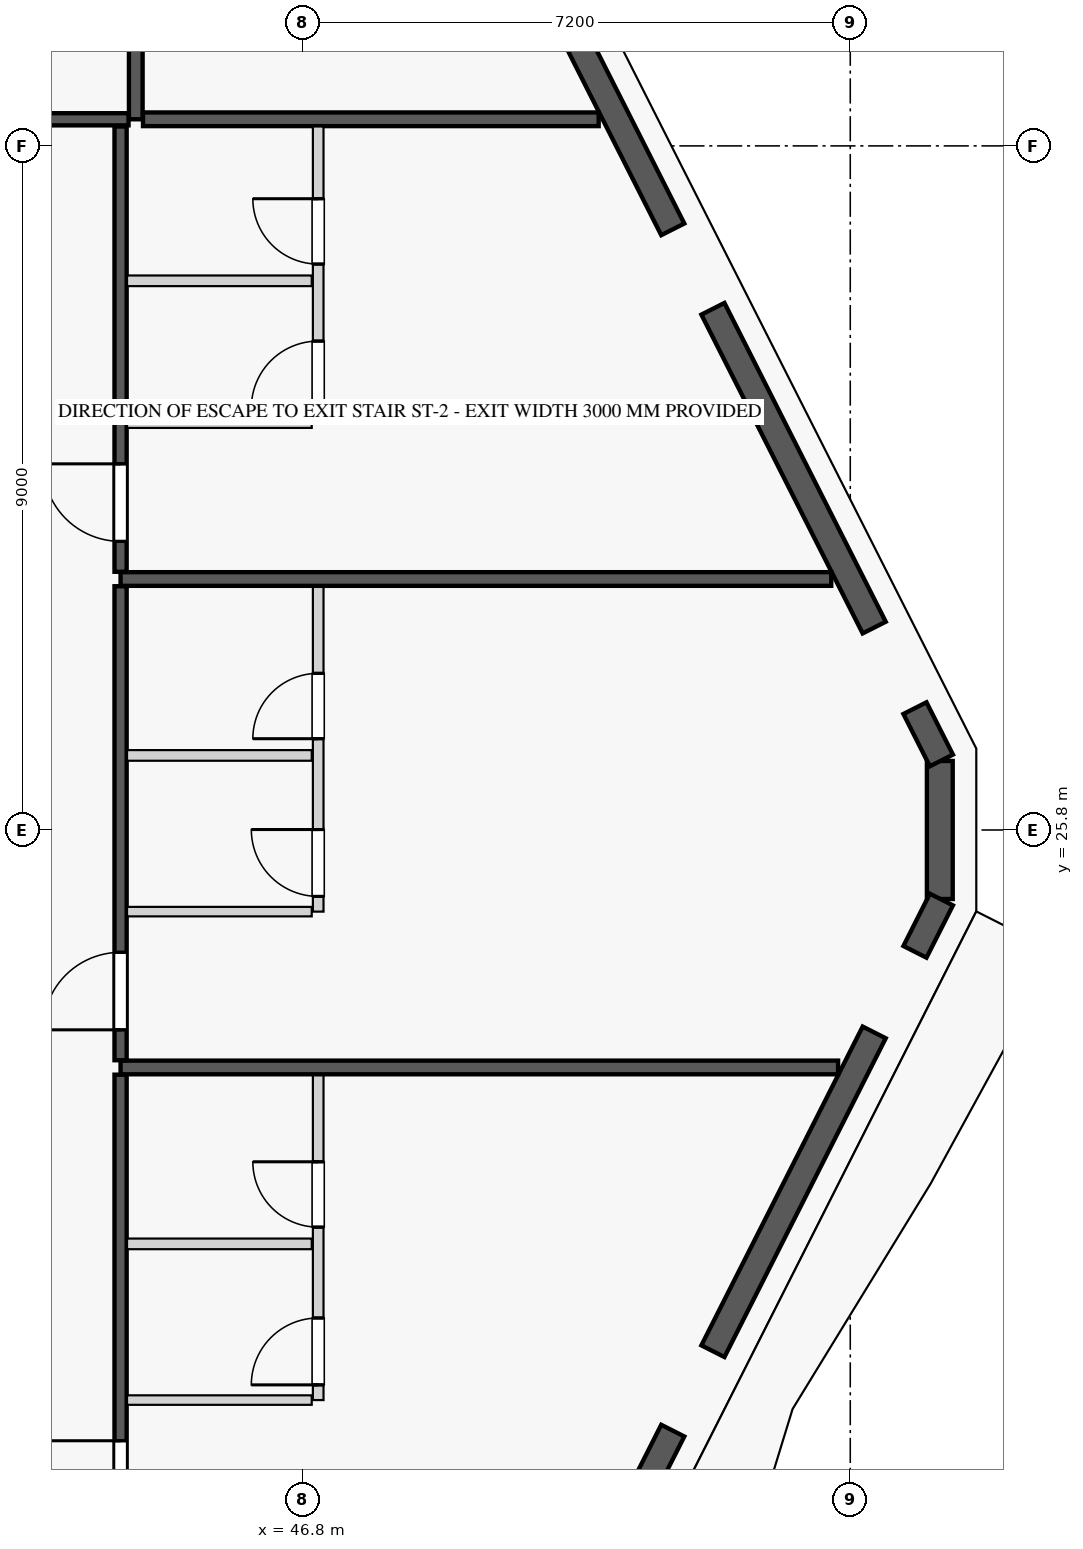
"""IFC4 building model, lengths in metres.
Left out: names, types, materials, properties, quantities, classifications, styles, units other than length and angle.
Written with IfcOpenShell. Run it as: python <this file> out.ifc"""

import sys

from ifc_helpers import new_model, si_unit, direction, frame, frame_2d, origin, origin_2d, place, context, subcontext, project, spatial, rectangle, extrude, element, fill, save


model = new_model("IFC4")
c1 = context("Model", 3, precision=1e-05, world=origin(), true_north=direction((0.0, 1.0)))
c2 = subcontext(c1, "Body", "Model", "MODEL_VIEW")
j1 = project(units=[si_unit("LENGTHUNIT", "METRE"), si_unit("PLANEANGLEUNIT", "RADIAN")], contexts=[c1])
p1 = place(None, origin())
s1 = spatial("IfcSite", under=j1, at=p1, CompositionType="ELEMENT")
p2 = place(p1, origin())
s2 = spatial("IfcBuilding", under=s1, at=p2, CompositionType="ELEMENT")
p3 = place(p2, frame((0.0, 0.0, 186.1)))
s3 = spatial("IfcBuildingStorey", under=s2, at=p3, CompositionType="ELEMENT", Elevation=186.1)
for number, where, z_axis, x_axis in (
    (1, (51.858, 18.429, 0.0), (0.0, 0.0, 1.0), (1.0, 0.0, 0.0)),
    (2, (54.547, 23.668, 0.0), (0.0, 0.0, 1.0), (1.0, 0.0, 0.0)),
    (3, (54.547, 27.932, 0.0), (0.0, 0.0, 1.0), (1.0, 0.0, 0.0)),
    (4, (51.858, 33.171, 0.0), (0.0, 0.0, 1.0), (1.0, 0.0, 0.0)),
):
    element("IfcColumn", number, at=place(p3, frame(where, z_axis=z_axis, x_axis=x_axis)), inside=s3, PredefinedType="COLUMN", context=c2, shape_type="SweptSolid", body=[
        extrude(rectangle(XDim=0.9, YDim=0.9, at=origin_2d()), origin(), (0.0, 0.0, 1.0), 3.55),
    ])
p4 = place(p3, frame((54.547, 25.8, 0.0), z_axis=(0.0, 0.0, 1.0), x_axis=(0.0, 1.0, 0.0)))
e5 = element("IfcColumn", 5, at=p4, inside=s3, PredefinedType="PILASTER", context=c2, shape_type="SweptSolid", body=[
    extrude(rectangle(XDim=0.5, YDim=0.35, at=origin_2d()), origin(), (0.0, 0.0, 1.0), 3.55),
])
p5 = place(p3, frame((55.178, 24.892, 0.0), z_axis=(0.0, 0.0, 1.0), x_axis=(0.0, 1.0, 0.0)))
e6 = element("IfcWall", 6, at=p5, inside=s3, PredefinedType="STANDARD", context=c2, shape_type="SweptSolid", body=[
    extrude(rectangle(XDim=1.816, YDim=0.34, at=frame_2d((0.908, 0.0))), origin(), (0.0, 0.0, 1.0), 3.35),
])
p6 = place(p5, frame((0.358, 0.0, 0.75)))
e7 = element("IfcOpeningElement", 7, at=p6, cuts=e6, PredefinedType="OPENING", context=c2, shape_type="SweptSolid", body=[
    extrude(rectangle(XDim=1.1, YDim=2.0, at=frame_2d((0.55, 1.0))), frame((0.0, 0.18, 0.0), z_axis=(0.0, -1.0, 0.0), x_axis=(1.0, 0.0, 0.0)), (0.0, 0.0, 1.0), 0.36),
])
p7 = place(p3, frame((49.448, 13.517, 0.0), z_axis=(0.0, 0.0, 1.0), x_axis=(0.451544279509, 0.892248711763, 0.0)))
e8 = element("IfcWall", 8, at=p7, inside=s3, PredefinedType="STANDARD", context=c2, shape_type="SweptSolid", body=[
    extrude(rectangle(XDim=4.91, YDim=0.34, at=frame_2d((2.455, 0.0))), origin(), (0.0, 0.0, 1.0), 2.883),
])
p8 = place(p7, frame((0.856, 0.0, 0.0)))
e9 = element("IfcOpeningElement", 9, at=p8, cuts=e8, PredefinedType="OPENING", context=c2, shape_type="SweptSolid", body=[
    extrude(rectangle(XDim=1.1, YDim=2.25, at=frame_2d((0.55, 1.125))), frame((0.0, 0.18, 0.0), z_axis=(0.0, -1.0, 0.0), x_axis=(1.0, 0.0, 0.0)), (0.0, 0.0, 1.0), 0.36),
])
p9 = place(p7, frame((3.457, 0.0, 0.75)))
e10 = element("IfcOpeningElement", 10, at=p9, cuts=e8, PredefinedType="OPENING", context=c2, shape_type="SweptSolid", body=[
    extrude(rectangle(XDim=1.1, YDim=1.983, at=frame_2d((0.55, 0.991))), frame((0.0, 0.18, 0.0), z_axis=(0.0, -1.0, 0.0), x_axis=(1.0, 0.0, 0.0)), (0.0, 0.0, 1.0), 0.36),
])
p10 = place(p3, frame((52.193, 18.943, 0.0), z_axis=(0.0, 0.0, 1.0), x_axis=(0.451447222193, 0.892297823361, 0.0)))
e11 = element("IfcWall", 11, at=p10, inside=s3, PredefinedType="STANDARD", context=c2, shape_type="SweptSolid", body=[
    extrude(rectangle(XDim=4.7, YDim=0.34, at=frame_2d((2.35, 0.0))), origin(), (0.0, 0.0, 1.0), 2.883),
])
p11 = place(p10, frame((1.8, 0.0, 0.75)))
e12 = element("IfcOpeningElement", 12, at=p11, cuts=e11, PredefinedType="OPENING", context=c2, shape_type="SweptSolid", body=[
    extrude(rectangle(XDim=1.1, YDim=1.983, at=frame_2d((0.55, 0.991))), frame((0.0, 0.18, 0.0), z_axis=(0.0, -1.0, 0.0), x_axis=(1.0, 0.0, 0.0)), (0.0, 0.0, 1.0), 0.36),
])
for number, where, z_axis, x_axis in (
    (13, (54.851, 24.197, 0.0), (0.0, 0.0, 1.0), (0.451, 0.892, 0.0)),
    (14, (55.199, 26.715, 0.0), (0.0, 0.0, 1.0), (-0.451, 0.892, 0.0)),
):
    element("IfcWall", number, at=place(p3, frame(where, z_axis=z_axis, x_axis=x_axis)), inside=s3, PredefinedType="STANDARD", context=c2, shape_type="SweptSolid", body=[
        extrude(rectangle(XDim=0.771, YDim=0.34, at=frame_2d((0.385, 0.0))), origin(), (0.0, 0.0, 1.0), 3.35),
    ])
p12 = place(p3, frame((54.315, 28.463, 0.0), z_axis=(0.0, 0.0, 1.0), x_axis=(-0.451426298588, 0.892308409096, 0.0)))
e15 = element("IfcWall", 15, at=p12, inside=s3, PredefinedType="STANDARD", context=c2, shape_type="SweptSolid", body=[
    extrude(rectangle(XDim=4.7, YDim=0.34, at=frame_2d((2.35, 0.0))), origin(), (0.0, 0.0, 1.0), 2.883),
])
p13 = place(p12, frame((1.8, 0.0, 0.75)))
e16 = element("IfcOpeningElement", 16, at=p13, cuts=e15, PredefinedType="OPENING", context=c2, shape_type="SweptSolid", body=[
    extrude(rectangle(XDim=1.1, YDim=1.983, at=frame_2d((0.55, 0.991))), frame((0.0, 0.18, 0.0), z_axis=(0.0, -1.0, 0.0), x_axis=(1.0, 0.0, 0.0)), (0.0, 0.0, 1.0), 0.36),
])
p14 = place(p3, frame((51.665, 33.702, 0.0), z_axis=(0.0, 0.0, 1.0), x_axis=(-0.451524246964, 0.89225884944, 0.0)))
e17 = element("IfcWall", 17, at=p14, inside=s3, PredefinedType="STANDARD", context=c2, shape_type="SweptSolid", body=[
    extrude(rectangle(XDim=4.91, YDim=0.34, at=frame_2d((2.455, 0.0))), origin(), (0.0, 0.0, 1.0), 2.883),
])
p15 = place(p14, frame((0.241, 0.0, 0.75)))
e18 = element("IfcOpeningElement", 18, at=p15, cuts=e17, PredefinedType="OPENING", context=c2, shape_type="SweptSolid", body=[
    extrude(rectangle(XDim=1.1, YDim=1.983, at=frame_2d((0.55, 0.991))), frame((0.0, 0.18, 0.0), z_axis=(0.0, -1.0, 0.0), x_axis=(1.0, 0.0, 0.0)), (0.0, 0.0, 1.0), 0.36),
])
p16 = place(p14, frame((2.847, 0.0, 0.75)))
e19 = element("IfcOpeningElement", 19, at=p16, cuts=e17, PredefinedType="OPENING", context=c2, shape_type="SweptSolid", body=[
    extrude(rectangle(XDim=1.1, YDim=1.983, at=frame_2d((0.55, 0.991))), frame((0.0, 0.18, 0.0), z_axis=(0.0, -1.0, 0.0), x_axis=(1.0, 0.0, 0.0)), (0.0, 0.0, 1.0), 0.36),
])
p17 = place(p3, frame((44.6, 35.15, 0.0), z_axis=(0.0, 0.0, 1.0), x_axis=(0.0, 1.0, 0.0)))
e20 = element("IfcWall", 20, at=p17, inside=s3, PredefinedType="PARTITIONING", context=c2, shape_type="SweptSolid", body=[
    extrude(rectangle(XDim=10.482, YDim=0.18, at=frame_2d((5.241, 0.0))), origin(), (0.0, 0.0, 1.0), 3.35),
])
p18 = place(p3, frame((20.295, 35.15, 0.0), z_axis=(0.0, 0.0, 1.0), x_axis=(1.0, 0.0, 0.0)))
e21 = element("IfcWall", 21, at=p18, inside=s3, PredefinedType="PARTITIONING", context=c2, shape_type="SweptSolid", body=[
    extrude(rectangle(XDim=24.21, YDim=0.16, at=frame_2d((12.105, 0.0))), origin(), (0.0, 0.0, 1.0), 3.35),
])
p19 = place(p18, frame((0.405, 0.0, 0.0)))
e22 = element("IfcOpeningElement", 22, at=p19, cuts=e21, PredefinedType="OPENING", context=c2, shape_type="SweptSolid", body=[
    extrude(rectangle(XDim=1.35, YDim=2.35, at=frame_2d((0.675, 1.175))), frame((0.0, 0.09, 0.0), z_axis=(0.0, -1.0, 0.0), x_axis=(1.0, 0.0, 0.0)), (0.0, 0.0, 1.0), 0.18),
])
p20 = place(p3, frame((44.695, 35.15, 0.0), z_axis=(0.0, 0.0, 1.0), x_axis=(1.0, 0.0, 0.0)))
e23 = element("IfcWall", 23, at=p20, inside=s3, PredefinedType="PARTITIONING", context=c2, shape_type="SweptSolid", body=[
    extrude(rectangle(XDim=5.995, YDim=0.18, at=frame_2d((2.998, 0.0))), origin(), (0.0, 0.0, 1.0), 3.35),
])
p21 = place(p3, frame((44.4, 16.345, 0.0), z_axis=(0.0, 0.0, 1.0), x_axis=(0.0, 1.0, 0.0)))
e24 = element("IfcWall", 24, at=p21, inside=s3, PredefinedType="PARTITIONING", context=c2, shape_type="SweptSolid", body=[
    extrude(rectangle(XDim=6.236, YDim=0.16, at=frame_2d((3.118, 0.0))), origin(), (0.0, 0.0, 1.0), 3.35),
])
p22 = place(p21, frame((0.4, 0.0, 0.0)))
e25 = element("IfcOpeningElement", 25, at=p22, cuts=e24, PredefinedType="OPENING", context=c2, shape_type="SweptSolid", body=[
    extrude(rectangle(XDim=1.02, YDim=2.25, at=frame_2d((0.51, 1.125))), frame((0.0, 0.09, 0.0), z_axis=(0.0, -1.0, 0.0), x_axis=(1.0, 0.0, 0.0)), (0.0, 0.0, 1.0), 0.18),
])
p23 = place(p3, frame((44.485, 18.3, 0.0), z_axis=(0.0, 0.0, 1.0), x_axis=(1.0, 0.0, 0.0)))
e26 = element("IfcWall", 26, at=p23, inside=s3, PredefinedType="PARTITIONING", context=c2, shape_type="SweptSolid", body=[
    extrude(rectangle(XDim=2.43, YDim=0.125, at=frame_2d((1.215, 0.0))), origin(), (0.0, 0.0, 1.0), 2.807),
])
p24 = place(p3, frame((47.0, 18.3, 0.0), z_axis=(0.0, 0.0, 1.0), x_axis=(0.0, 1.0, 0.0)))
e27 = element("IfcWall", 27, at=p24, inside=s3, PredefinedType="PLUMBINGWALL", context=c2, shape_type="SweptSolid", body=[
    extrude(rectangle(XDim=4.281, YDim=0.14, at=frame_2d((2.141, 0.0))), origin(), (0.0, 0.0, 1.0), 3.35),
])
p25 = place(p24, frame((2.275, 0.0, 0.0)))
e28 = element("IfcOpeningElement", 28, at=p25, cuts=e27, PredefinedType="OPENING", context=c2, shape_type="SweptSolid", body=[
    extrude(rectangle(XDim=0.86, YDim=2.1, at=frame_2d((0.43, 1.05))), frame((0.0, 0.08, 0.0), z_axis=(0.0, -1.0, 0.0), x_axis=(1.0, 0.0, 0.0)), (0.0, 0.0, 1.0), 0.16),
])
p26 = place(p24, frame((0.2, 0.0, 0.0)))
e29 = element("IfcOpeningElement", 29, at=p26, cuts=e27, PredefinedType="OPENING", context=c2, shape_type="SweptSolid", body=[
    extrude(rectangle(XDim=0.88, YDim=2.15, at=frame_2d((0.44, 1.075))), frame((0.0, 0.08, 0.0), z_axis=(0.0, -1.0, 0.0), x_axis=(1.0, 0.0, 0.0)), (0.0, 0.0, 1.0), 0.16),
])
p27 = place(p3, frame((44.485, 20.355, 0.0), z_axis=(0.0, 0.0, 1.0), x_axis=(1.0, 0.0, 0.0)))
e30 = element("IfcWall", 30, at=p27, inside=s3, PredefinedType="PLUMBINGWALL", context=c2, shape_type="SweptSolid", body=[
    extrude(rectangle(XDim=2.43, YDim=0.14, at=frame_2d((1.215, 0.0))), origin(), (0.0, 0.0, 1.0), 3.35),
])
p28 = place(p3, frame((44.4, 22.676, 0.0), z_axis=(0.0, 0.0, 1.0), x_axis=(1.0, 0.0, 0.0)))
e31 = element("IfcWall", 31, at=p28, inside=s3, PredefinedType="PARTITIONING", context=c2, shape_type="SweptSolid", body=[
    extrude(rectangle(XDim=9.44, YDim=0.18, at=frame_2d((4.72, 0.0))), origin(), (0.0, 0.0, 1.0), 3.35),
])
p29 = place(p3, frame((44.4, 22.771, 0.0), z_axis=(0.0, 0.0, 1.0), x_axis=(0.0, 1.0, 0.0)))
e32 = element("IfcWall", 32, at=p29, inside=s3, PredefinedType="PARTITIONING", context=c2, shape_type="SweptSolid", body=[
    extrude(rectangle(XDim=6.236, YDim=0.16, at=frame_2d((3.118, 0.0))), origin(), (0.0, 0.0, 1.0), 3.35),
])
p30 = place(p29, frame((0.4, 0.0, 0.0)))
e33 = element("IfcOpeningElement", 33, at=p30, cuts=e32, PredefinedType="OPENING", context=c2, shape_type="SweptSolid", body=[
    extrude(rectangle(XDim=1.02, YDim=2.25, at=frame_2d((0.51, 1.125))), frame((0.0, 0.09, 0.0), z_axis=(0.0, -1.0, 0.0), x_axis=(1.0, 0.0, 0.0)), (0.0, 0.0, 1.0), 0.18),
])
p31 = place(p3, frame((44.485, 24.726, 0.0), z_axis=(0.0, 0.0, 1.0), x_axis=(1.0, 0.0, 0.0)))
e34 = element("IfcWall", 34, at=p31, inside=s3, PredefinedType="PARTITIONING", context=c2, shape_type="SweptSolid", body=[
    extrude(rectangle(XDim=2.43, YDim=0.125, at=frame_2d((1.215, 0.0))), origin(), (0.0, 0.0, 1.0), 3.35),
])
p32 = place(p3, frame((47.0, 24.726, 0.0), z_axis=(0.0, 0.0, 1.0), x_axis=(0.0, 1.0, 0.0)))
e35 = element("IfcWall", 35, at=p32, inside=s3, PredefinedType="PLUMBINGWALL", context=c2, shape_type="SweptSolid", body=[
    extrude(rectangle(XDim=4.281, YDim=0.14, at=frame_2d((2.141, 0.0))), origin(), (0.0, 0.0, 1.0), 3.35),
])
p33 = place(p32, frame((2.275, 0.0, 0.0)))
e36 = element("IfcOpeningElement", 36, at=p33, cuts=e35, PredefinedType="OPENING", context=c2, shape_type="SweptSolid", body=[
    extrude(rectangle(XDim=0.86, YDim=2.1, at=frame_2d((0.43, 1.05))), frame((0.0, 0.08, 0.0), z_axis=(0.0, -1.0, 0.0), x_axis=(1.0, 0.0, 0.0)), (0.0, 0.0, 1.0), 0.16),
])
p34 = place(p32, frame((0.2, 0.0, 0.0)))
e37 = element("IfcOpeningElement", 37, at=p34, cuts=e35, PredefinedType="OPENING", context=c2, shape_type="SweptSolid", body=[
    extrude(rectangle(XDim=0.88, YDim=2.15, at=frame_2d((0.44, 1.075))), frame((0.0, 0.08, 0.0), z_axis=(0.0, -1.0, 0.0), x_axis=(1.0, 0.0, 0.0)), (0.0, 0.0, 1.0), 0.16),
])
p35 = place(p3, frame((44.485, 26.781, 0.0), z_axis=(0.0, 0.0, 1.0), x_axis=(1.0, 0.0, 0.0)))
e38 = element("IfcWall", 38, at=p35, inside=s3, PredefinedType="PLUMBINGWALL", context=c2, shape_type="SweptSolid", body=[
    extrude(rectangle(XDim=2.43, YDim=0.14, at=frame_2d((1.215, 0.0))), origin(), (0.0, 0.0, 1.0), 3.35),
])
p36 = place(p3, frame((44.4, 29.102, 0.0), z_axis=(0.0, 0.0, 1.0), x_axis=(1.0, 0.0, 0.0)))
e39 = element("IfcWall", 39, at=p36, inside=s3, PredefinedType="PARTITIONING", context=c2, shape_type="SweptSolid", body=[
    extrude(rectangle(XDim=9.35, YDim=0.18, at=frame_2d((4.675, 0.0))), origin(), (0.0, 0.0, 1.0), 3.35),
])
p37 = place(p3, frame((44.4, 29.197, 0.0), z_axis=(0.0, 0.0, 1.0), x_axis=(0.0, 1.0, 0.0)))
e40 = element("IfcWall", 40, at=p37, inside=s3, PredefinedType="PARTITIONING", context=c2, shape_type="SweptSolid", body=[
    extrude(rectangle(XDim=5.858, YDim=0.16, at=frame_2d((2.929, 0.0))), origin(), (0.0, 0.0, 1.0), 3.35),
])
p38 = place(p37, frame((0.4, 0.0, 0.0)))
e41 = element("IfcOpeningElement", 41, at=p38, cuts=e40, PredefinedType="OPENING", context=c2, shape_type="SweptSolid", body=[
    extrude(rectangle(XDim=1.02, YDim=2.25, at=frame_2d((0.51, 1.125))), frame((0.0, 0.09, 0.0), z_axis=(0.0, -1.0, 0.0), x_axis=(1.0, 0.0, 0.0)), (0.0, 0.0, 1.0), 0.18),
])
p39 = place(p3, frame((44.485, 31.152, 0.0), z_axis=(0.0, 0.0, 1.0), x_axis=(1.0, 0.0, 0.0)))
e42 = element("IfcWall", 42, at=p39, inside=s3, PredefinedType="PARTITIONING", context=c2, shape_type="SweptSolid", body=[
    extrude(rectangle(XDim=2.43, YDim=0.125, at=frame_2d((1.215, 0.0))), origin(), (0.0, 0.0, 1.0), 3.35),
])
p40 = place(p3, frame((47.0, 31.152, 0.0), z_axis=(0.0, 0.0, 1.0), x_axis=(0.0, 1.0, 0.0)))
e43 = element("IfcWall", 43, at=p40, inside=s3, PredefinedType="PLUMBINGWALL", context=c2, shape_type="SweptSolid", body=[
    extrude(rectangle(XDim=3.903, YDim=0.14, at=frame_2d((1.951, 0.0))), origin(), (0.0, 0.0, 1.0), 3.35),
])
p41 = place(p40, frame((2.093, 0.0, 0.0)))
e44 = element("IfcOpeningElement", 44, at=p41, cuts=e43, PredefinedType="OPENING", context=c2, shape_type="SweptSolid", body=[
    extrude(rectangle(XDim=0.86, YDim=2.1, at=frame_2d((0.43, 1.05))), frame((0.0, 0.08, 0.0), z_axis=(0.0, -1.0, 0.0), x_axis=(1.0, 0.0, 0.0)), (0.0, 0.0, 1.0), 0.16),
])
p42 = place(p40, frame((0.2, 0.0, 0.0)))
e45 = element("IfcOpeningElement", 45, at=p42, cuts=e43, PredefinedType="OPENING", context=c2, shape_type="SweptSolid", body=[
    extrude(rectangle(XDim=0.88, YDim=2.15, at=frame_2d((0.44, 1.075))), frame((0.0, 0.08, 0.0), z_axis=(0.0, -1.0, 0.0), x_axis=(1.0, 0.0, 0.0)), (0.0, 0.0, 1.0), 0.16),
])
p43 = place(p3, frame((44.485, 33.025, 0.0), z_axis=(0.0, 0.0, 1.0), x_axis=(1.0, 0.0, 0.0)))
e46 = element("IfcWall", 46, at=p43, inside=s3, PredefinedType="PLUMBINGWALL", context=c2, shape_type="SweptSolid", body=[
    extrude(rectangle(XDim=2.43, YDim=0.14, at=frame_2d((1.215, 0.0))), origin(), (0.0, 0.0, 1.0), 3.35),
])
p44 = place(p11, origin())
e47 = element("IfcWindow", 47, at=p44, inside=s3, PartitioningType="SINGLE_PANEL", PredefinedType="WINDOW", context=c2, shape_type="SweptSolid", body=[
    extrude(rectangle(XDim=1.1, YDim=1.983, at=frame_2d((0.55, 0.991))), frame((0.0, 0.03, 0.0), z_axis=(0.0, -1.0, 0.0), x_axis=(1.0, 0.0, 0.0)), (0.0, 0.0, 1.0), 0.06),
])
fill(e12, e47)
p45 = place(p13, origin())
e48 = element("IfcWindow", 48, at=p45, inside=s3, PartitioningType="SINGLE_PANEL", PredefinedType="WINDOW", context=c2, shape_type="SweptSolid", body=[
    extrude(rectangle(XDim=1.1, YDim=1.983, at=frame_2d((0.55, 0.991))), frame((0.0, 0.03, 0.0), z_axis=(0.0, -1.0, 0.0), x_axis=(1.0, 0.0, 0.0)), (0.0, 0.0, 1.0), 0.06),
])
fill(e16, e48)
p46 = place(p15, origin())
e49 = element("IfcWindow", 49, at=p46, inside=s3, PartitioningType="SINGLE_PANEL", PredefinedType="WINDOW", context=c2, shape_type="SweptSolid", body=[
    extrude(rectangle(XDim=1.1, YDim=1.983, at=frame_2d((0.55, 0.991))), frame((0.0, 0.03, 0.0), z_axis=(0.0, -1.0, 0.0), x_axis=(1.0, 0.0, 0.0)), (0.0, 0.0, 1.0), 0.06),
])
fill(e18, e49)
p47 = place(p25, origin())
e50 = element("IfcDoor", 50, at=p47, inside=s3, OperationType="SINGLE_SWING_RIGHT", PredefinedType="DOOR", context=c2, shape_type="SweptSolid", body=[
    extrude(rectangle(XDim=0.86, YDim=2.1, at=frame_2d((0.43, 1.05))), frame((0.0, 0.025, 0.0), z_axis=(0.0, -1.0, 0.0), x_axis=(1.0, 0.0, 0.0)), (0.0, 0.0, 1.0), 0.05),
])
fill(e28, e50)
p48 = place(p22, origin())
e51 = element("IfcDoor", 51, at=p48, inside=s3, OperationType="SINGLE_SWING_RIGHT", PredefinedType="DOOR", context=c2, shape_type="SweptSolid", body=[
    extrude(rectangle(XDim=1.02, YDim=2.25, at=frame_2d((0.51, 1.125))), frame((0.0, 0.025, 0.0), z_axis=(0.0, -1.0, 0.0), x_axis=(1.0, 0.0, 0.0)), (0.0, 0.0, 1.0), 0.05),
])
fill(e25, e51)
p49 = place(p26, origin())
e52 = element("IfcDoor", 52, at=p49, inside=s3, OperationType="SINGLE_SWING_LEFT", PredefinedType="DOOR", context=c2, shape_type="SweptSolid", body=[
    extrude(rectangle(XDim=0.88, YDim=2.15, at=frame_2d((0.44, 1.075))), frame((0.0, 0.025, 0.0), z_axis=(0.0, -1.0, 0.0), x_axis=(1.0, 0.0, 0.0)), (0.0, 0.0, 1.0), 0.05),
])
fill(e29, e52)
p50 = place(p33, origin())
e53 = element("IfcDoor", 53, at=p50, inside=s3, OperationType="SINGLE_SWING_LEFT", PredefinedType="DOOR", context=c2, shape_type="SweptSolid", body=[
    extrude(rectangle(XDim=0.86, YDim=2.1, at=frame_2d((0.43, 1.05))), frame((0.0, 0.025, 0.0), z_axis=(0.0, -1.0, 0.0), x_axis=(1.0, 0.0, 0.0)), (0.0, 0.0, 1.0), 0.05),
])
fill(e36, e53)
p51 = place(p30, origin())
e54 = element("IfcDoor", 54, at=p51, inside=s3, OperationType="SINGLE_SWING_LEFT", PredefinedType="DOOR", context=c2, shape_type="SweptSolid", body=[
    extrude(rectangle(XDim=1.02, YDim=2.25, at=frame_2d((0.51, 1.125))), frame((0.0, 0.025, 0.0), z_axis=(0.0, -1.0, 0.0), x_axis=(1.0, 0.0, 0.0)), (0.0, 0.0, 1.0), 0.05),
])
fill(e33, e54)
p52 = place(p34, origin())
e55 = element("IfcDoor", 55, at=p52, inside=s3, OperationType="SINGLE_SWING_RIGHT", PredefinedType="DOOR", context=c2, shape_type="SweptSolid", body=[
    extrude(rectangle(XDim=0.88, YDim=2.15, at=frame_2d((0.44, 1.075))), frame((0.0, 0.025, 0.0), z_axis=(0.0, -1.0, 0.0), x_axis=(1.0, 0.0, 0.0)), (0.0, 0.0, 1.0), 0.05),
])
fill(e37, e55)
p53 = place(p41, origin())
e56 = element("IfcDoor", 56, at=p53, inside=s3, OperationType="SINGLE_SWING_RIGHT", PredefinedType="DOOR", context=c2, shape_type="SweptSolid", body=[
    extrude(rectangle(XDim=0.86, YDim=2.1, at=frame_2d((0.43, 1.05))), frame((0.0, 0.025, 0.0), z_axis=(0.0, -1.0, 0.0), x_axis=(1.0, 0.0, 0.0)), (0.0, 0.0, 1.0), 0.05),
])
fill(e44, e56)
p54 = place(p38, origin())
e57 = element("IfcDoor", 57, at=p54, inside=s3, OperationType="SINGLE_SWING_RIGHT", PredefinedType="DOOR", context=c2, shape_type="SweptSolid", body=[
    extrude(rectangle(XDim=1.02, YDim=2.25, at=frame_2d((0.51, 1.125))), frame((0.0, 0.025, 0.0), z_axis=(0.0, -1.0, 0.0), x_axis=(1.0, 0.0, 0.0)), (0.0, 0.0, 1.0), 0.05),
])
fill(e41, e57)
p55 = place(p42, origin())
e58 = element("IfcDoor", 58, at=p55, inside=s3, OperationType="SINGLE_SWING_LEFT", PredefinedType="DOOR", context=c2, shape_type="SweptSolid", body=[
    extrude(rectangle(XDim=0.88, YDim=2.15, at=frame_2d((0.44, 1.075))), frame((0.0, 0.025, 0.0), z_axis=(0.0, -1.0, 0.0), x_axis=(1.0, 0.0, 0.0)), (0.0, 0.0, 1.0), 0.05),
])
fill(e45, e58)
p56 = place(p9, origin())
e59 = element("IfcWindow", 59, at=p56, inside=s3, PartitioningType="SINGLE_PANEL", PredefinedType="WINDOW", context=c2, shape_type="SweptSolid", body=[
    extrude(rectangle(XDim=1.1, YDim=1.983, at=frame_2d((0.55, 0.991))), frame((0.0, 0.03, 0.0), z_axis=(0.0, -1.0, 0.0), x_axis=(1.0, 0.0, 0.0)), (0.0, 0.0, 1.0), 0.06),
])
fill(e10, e59)
p57 = place(p6, origin())
e60 = element("IfcWindow", 60, at=p57, inside=s3, PartitioningType="SINGLE_PANEL", PredefinedType="WINDOW", context=c2, shape_type="SweptSolid", body=[
    extrude(rectangle(XDim=1.1, YDim=2.0, at=frame_2d((0.55, 1.0))), frame((0.0, 0.03, 0.0), z_axis=(0.0, -1.0, 0.0), x_axis=(1.0, 0.0, 0.0)), (0.0, 0.0, 1.0), 0.06),
])
fill(e7, e60)
save(model, sys.argv[1])
